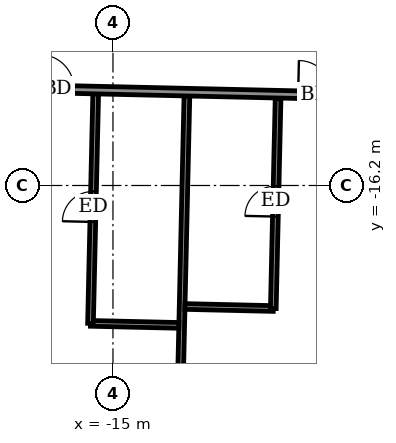
"""IFC4 building model, lengths in metres.
Left out: names, types, materials, properties, quantities, classifications, styles, units other than length and angle.
Written with IfcOpenShell. Run it as: python <this file> out.ifc"""

import sys

from ifc_helpers import new_model, si_unit, direction, frame, frame_2d, origin, place, context, subcontext, project, spatial, rectangle, extrude, element, fill, save


model = new_model("IFC4")
c1 = context("Model", 3, precision=1e-05, world=origin(), true_north=direction((0.0, 1.0)))
c2 = subcontext(c1, "Body", "Model", "MODEL_VIEW")
j1 = project(units=[si_unit("LENGTHUNIT", "METRE"), si_unit("PLANEANGLEUNIT", "RADIAN")], contexts=[c1])
p1 = place(None, origin())
s1 = spatial("IfcSite", under=j1, at=p1, CompositionType="ELEMENT")
p2 = place(p1, origin())
s2 = spatial("IfcBuilding", under=s1, at=p2, CompositionType="ELEMENT")
p3 = place(p2, frame((0.0, 0.0, 316.9)))
s3 = spatial("IfcBuildingStorey", under=s2, at=p3, CompositionType="ELEMENT", Elevation=316.9)
p4 = place(p3, frame((-13.314, -25.291, 0.0), z_axis=(0.0, 0.0, 1.0), x_axis=(0.022708327922, 0.999742132674, 0.0)))
e1 = element("IfcWall", 1, at=p4, inside=s3, PredefinedType="PARTITIONING", context=c2, shape_type="SweptSolid", body=[
    extrude(rectangle(XDim=11.45, YDim=0.15, at=frame_2d((5.725, 0.0))), origin(), (0.0, 0.0, 1.0), 2.5),
])
p5 = place(p3, frame((-15.591, -19.828, 0.0), z_axis=(0.0, 0.0, 1.0), x_axis=(0.999738082346, -0.022885950011, 0.0)))
e2 = element("IfcWall", 2, at=p5, inside=s3, PredefinedType="PARTITIONING", context=c2, shape_type="SweptSolid", body=[
    extrude(rectangle(XDim=2.325, YDim=0.15, at=frame_2d((1.163, 0.0))), origin(), (0.0, 0.0, 1.0), 3.05),
])
p6 = place(p3, frame((-15.591, -19.828, 0.0), z_axis=(0.0, 0.0, 1.0), x_axis=(0.022678246714, 0.999742815491, 0.0)))
e3 = element("IfcWall", 3, at=p6, inside=s3, PredefinedType="PARTITIONING", context=c2, shape_type="SweptSolid", body=[
    extrude(rectangle(XDim=6.039, YDim=0.15, at=frame_2d((3.02, 0.0))), origin(), (0.0, 0.0, 1.0), 3.05),
])
p7 = place(p6, frame((2.67, 0.0, 0.0)))
e4 = element("IfcOpeningElement", 4, at=p7, cuts=e3, PredefinedType="OPENING", context=c2, shape_type="SweptSolid", body=[
    extrude(rectangle(XDim=0.8, YDim=2.1, at=frame_2d((0.4, 1.05))), frame((0.0, 0.085, 0.0), z_axis=(0.0, -1.0, 0.0), x_axis=(1.0, 0.0, 0.0)), (0.0, 0.0, 1.0), 0.17),
])
p8 = place(p3, frame((-13.105, -19.384, 0.0), z_axis=(0.0, 0.0, 1.0), x_axis=(0.999740260747, -0.02279059109, 0.0)))
e5 = element("IfcWall", 5, at=p8, inside=s3, PredefinedType="PARTITIONING", context=c2, shape_type="SweptSolid", body=[
    extrude(rectangle(XDim=2.324, YDim=0.15, at=frame_2d((1.162, 0.0))), origin(), (0.0, 0.0, 1.0), 3.05),
])
p9 = place(p3, frame((-10.781, -19.437, 0.0), z_axis=(0.0, 0.0, 1.0), x_axis=(0.022741427977, 0.999741380285, 0.0)))
e6 = element("IfcWall", 6, at=p9, inside=s3, PredefinedType="PARTITIONING", context=c2, shape_type="SweptSolid", body=[
    extrude(rectangle(XDim=5.54, YDim=0.15, at=frame_2d((2.77, 0.0))), origin(), (0.0, 0.0, 1.0), 3.05),
])
p10 = place(p9, frame((2.42, 0.0, 0.0)))
e7 = element("IfcOpeningElement", 7, at=p10, cuts=e6, PredefinedType="OPENING", context=c2, shape_type="SweptSolid", body=[
    extrude(rectangle(XDim=0.8, YDim=2.1, at=frame_2d((0.4, 1.05))), frame((0.0, 0.085, 0.0), z_axis=(0.0, -1.0, 0.0), x_axis=(1.0, 0.0, 0.0)), (0.0, 0.0, 1.0), 0.17),
])
p11 = place(p3, frame((-31.347, -13.329, 0.0), z_axis=(0.0, 0.0, 1.0), x_axis=(0.999742613079, -0.022687168058, 0.0)))
e8 = element("IfcWall", 8, at=p11, inside=s3, PredefinedType="PARTITIONING", context=c2, shape_type="SweptSolid", body=[
    extrude(rectangle(XDim=58.799, YDim=0.2, at=frame_2d((29.399, 0.0))), origin(), (0.0, 0.0, 1.0), 3.05),
])
p12 = place(p11, frame((2.075, 0.0, 0.0)))
e9 = element("IfcOpeningElement", 9, at=p12, cuts=e8, PredefinedType="OPENING", context=c2, shape_type="SweptSolid", body=[
    extrude(rectangle(XDim=1.0, YDim=2.1, at=frame_2d((0.5, 1.05))), frame((0.0, 0.11, 0.0), z_axis=(0.0, -1.0, 0.0), x_axis=(1.0, 0.0, 0.0)), (0.0, 0.0, 1.0), 0.22),
])
p13 = place(p11, frame((7.5, 0.0, 0.0)))
e10 = element("IfcOpeningElement", 10, at=p13, cuts=e8, PredefinedType="OPENING", context=c2, shape_type="SweptSolid", body=[
    extrude(rectangle(XDim=0.9, YDim=2.1, at=frame_2d((0.45, 1.05))), frame((0.0, 0.11, 0.0), z_axis=(0.0, -1.0, 0.0), x_axis=(1.0, 0.0, 0.0)), (0.0, 0.0, 1.0), 0.22),
])
p14 = place(p11, frame((12.35, 0.0, 0.0)))
e11 = element("IfcOpeningElement", 11, at=p14, cuts=e8, PredefinedType="OPENING", context=c2, shape_type="SweptSolid", body=[
    extrude(rectangle(XDim=0.9, YDim=2.1, at=frame_2d((0.45, 1.05))), frame((0.0, 0.11, 0.0), z_axis=(0.0, -1.0, 0.0), x_axis=(1.0, 0.0, 0.0)), (0.0, 0.0, 1.0), 0.22),
])
p15 = place(p11, frame((14.425, 0.0, 0.0)))
e12 = element("IfcOpeningElement", 12, at=p15, cuts=e8, PredefinedType="OPENING", context=c2, shape_type="SweptSolid", body=[
    extrude(rectangle(XDim=0.9, YDim=2.1, at=frame_2d((0.45, 1.05))), frame((0.0, 0.11, 0.0), z_axis=(0.0, -1.0, 0.0), x_axis=(1.0, 0.0, 0.0)), (0.0, 0.0, 1.0), 0.22),
])
p16 = place(p11, frame((21.225, 0.0, 0.0)))
e13 = element("IfcOpeningElement", 13, at=p16, cuts=e8, PredefinedType="OPENING", context=c2, shape_type="SweptSolid", body=[
    extrude(rectangle(XDim=0.9, YDim=2.1, at=frame_2d((0.45, 1.05))), frame((0.0, 0.11, 0.0), z_axis=(0.0, -1.0, 0.0), x_axis=(1.0, 0.0, 0.0)), (0.0, 0.0, 1.0), 0.22),
])
p17 = place(p11, frame((23.25, 0.0, 0.0)))
e14 = element("IfcOpeningElement", 14, at=p17, cuts=e8, PredefinedType="OPENING", context=c2, shape_type="SweptSolid", body=[
    extrude(rectangle(XDim=0.9, YDim=2.1, at=frame_2d((0.45, 1.05))), frame((0.0, 0.11, 0.0), z_axis=(0.0, -1.0, 0.0), x_axis=(1.0, 0.0, 0.0)), (0.0, 0.0, 1.0), 0.22),
])
p18 = place(p11, frame((30.025, 0.0, 0.0)))
e15 = element("IfcOpeningElement", 15, at=p18, cuts=e8, PredefinedType="OPENING", context=c2, shape_type="SweptSolid", body=[
    extrude(rectangle(XDim=0.9, YDim=2.1, at=frame_2d((0.45, 1.05))), frame((0.0, 0.11, 0.0), z_axis=(0.0, -1.0, 0.0), x_axis=(1.0, 0.0, 0.0)), (0.0, 0.0, 1.0), 0.22),
])
p19 = place(p11, frame((32.025, 0.0, 0.0)))
e16 = element("IfcOpeningElement", 16, at=p19, cuts=e8, PredefinedType="OPENING", context=c2, shape_type="SweptSolid", body=[
    extrude(rectangle(XDim=0.9, YDim=2.1, at=frame_2d((0.45, 1.05))), frame((0.0, 0.11, 0.0), z_axis=(0.0, -1.0, 0.0), x_axis=(1.0, 0.0, 0.0)), (0.0, 0.0, 1.0), 0.22),
])
p20 = place(p11, frame((38.95, 0.0, 0.0)))
e17 = element("IfcOpeningElement", 17, at=p20, cuts=e8, PredefinedType="OPENING", context=c2, shape_type="SweptSolid", body=[
    extrude(rectangle(XDim=0.9, YDim=2.1, at=frame_2d((0.45, 1.05))), frame((0.0, 0.11, 0.0), z_axis=(0.0, -1.0, 0.0), x_axis=(1.0, 0.0, 0.0)), (0.0, 0.0, 1.0), 0.22),
])
p21 = place(p11, frame((41.05, 0.0, 0.0)))
e18 = element("IfcOpeningElement", 18, at=p21, cuts=e8, PredefinedType="OPENING", context=c2, shape_type="SweptSolid", body=[
    extrude(rectangle(XDim=0.9, YDim=2.1, at=frame_2d((0.45, 1.05))), frame((0.0, 0.11, 0.0), z_axis=(0.0, -1.0, 0.0), x_axis=(1.0, 0.0, 0.0)), (0.0, 0.0, 1.0), 0.22),
])
p22 = place(p11, frame((47.925, 0.0, 0.0)))
e19 = element("IfcOpeningElement", 19, at=p22, cuts=e8, PredefinedType="OPENING", context=c2, shape_type="SweptSolid", body=[
    extrude(rectangle(XDim=0.9, YDim=2.1, at=frame_2d((0.45, 1.05))), frame((0.0, 0.11, 0.0), z_axis=(0.0, -1.0, 0.0), x_axis=(1.0, 0.0, 0.0)), (0.0, 0.0, 1.0), 0.22),
])
p23 = place(p11, frame((53.618, 0.0, 0.0)))
e20 = element("IfcOpeningElement", 20, at=p23, cuts=e8, PredefinedType="OPENING", context=c2, shape_type="SweptSolid", body=[
    extrude(rectangle(XDim=1.0, YDim=2.1, at=frame_2d((0.5, 1.05))), frame((0.0, 0.11, 0.0), z_axis=(0.0, -1.0, 0.0), x_axis=(1.0, 0.0, 0.0)), (0.0, 0.0, 1.0), 0.22),
])
p24 = place(p15, origin())
e21 = element("IfcDoor", 21, at=p24, inside=s3, OperationType="SINGLE_SWING_RIGHT", PredefinedType="DOOR", context=c2, shape_type="SweptSolid", body=[
    extrude(rectangle(XDim=0.9, YDim=2.1, at=frame_2d((0.45, 1.05))), frame((0.0, 0.025, 0.0), z_axis=(0.0, -1.0, 0.0), x_axis=(1.0, 0.0, 0.0)), (0.0, 0.0, 1.0), 0.05),
])
fill(e12, e21)
p25 = place(p7, origin())
e22 = element("IfcDoor", 22, at=p25, inside=s3, OperationType="SINGLE_SWING_RIGHT", PredefinedType="DOOR", context=c2, shape_type="SweptSolid", body=[
    extrude(rectangle(XDim=0.8, YDim=2.1, at=frame_2d((0.4, 1.05))), frame((0.0, 0.025, 0.0), z_axis=(0.0, -1.0, 0.0), x_axis=(1.0, 0.0, 0.0)), (0.0, 0.0, 1.0), 0.05),
])
fill(e4, e22)
p26 = place(p16, origin())
e23 = element("IfcDoor", 23, at=p26, inside=s3, OperationType="SINGLE_SWING_LEFT", PredefinedType="DOOR", context=c2, shape_type="SweptSolid", body=[
    extrude(rectangle(XDim=0.9, YDim=2.1, at=frame_2d((0.45, 1.05))), frame((0.0, 0.025, 0.0), z_axis=(0.0, -1.0, 0.0), x_axis=(1.0, 0.0, 0.0)), (0.0, 0.0, 1.0), 0.05),
])
fill(e13, e23)
p27 = place(p10, origin())
e24 = element("IfcDoor", 24, at=p27, inside=s3, OperationType="SINGLE_SWING_LEFT", PredefinedType="DOOR", context=c2, shape_type="SweptSolid", body=[
    extrude(rectangle(XDim=0.8, YDim=2.1, at=frame_2d((0.4, 1.05))), frame((0.0, 0.025, 0.0), z_axis=(0.0, -1.0, 0.0), x_axis=(1.0, 0.0, 0.0)), (0.0, 0.0, 1.0), 0.05),
])
fill(e7, e24)
save(model, sys.argv[1])
